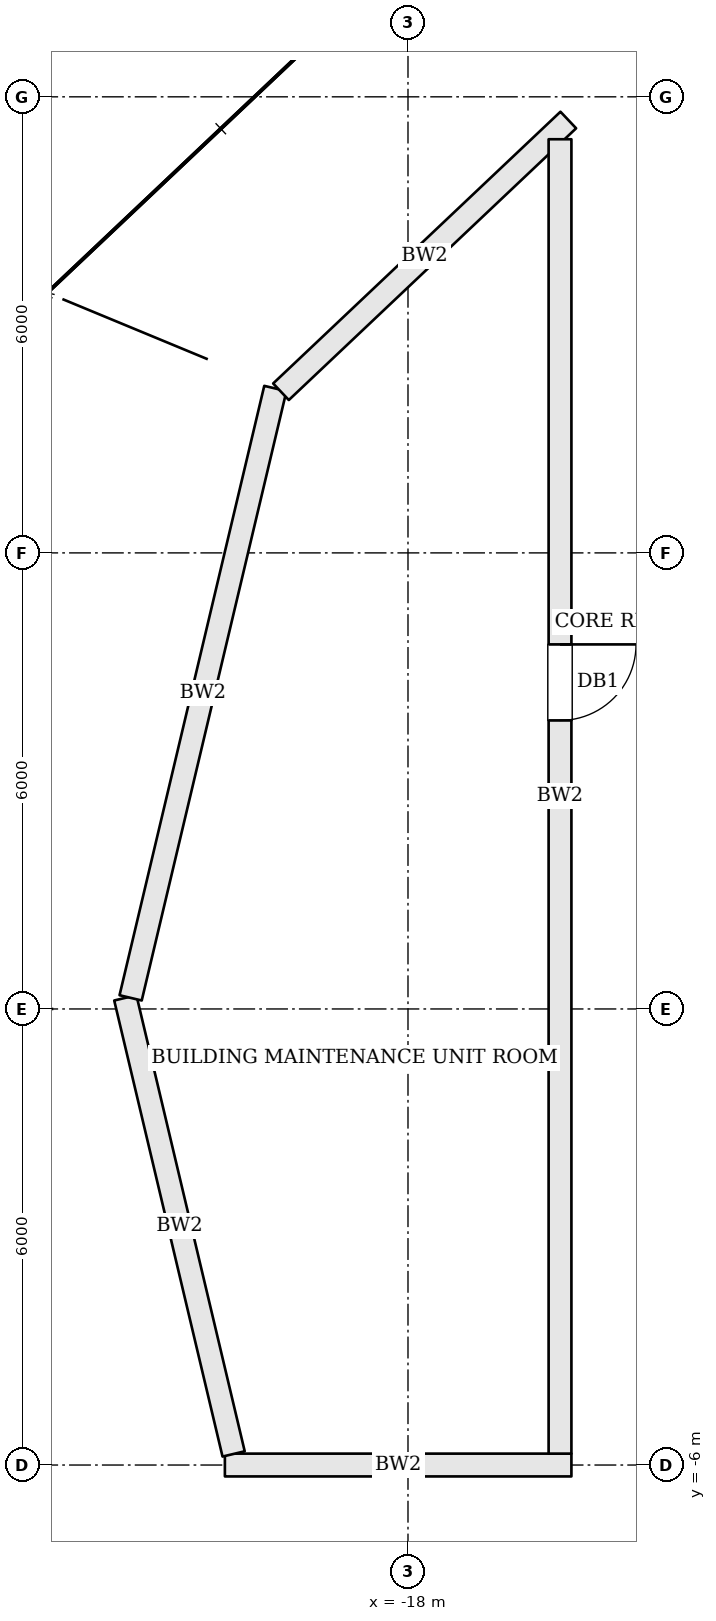
"""IFC4 building model, lengths in metres.
Left out: names, types, materials, properties, quantities, classifications, styles, units other than length and angle.
Written with IfcOpenShell. Run it as: python <this file> out.ifc"""

import sys

from ifc_helpers import new_model, si_unit, direction, frame, frame_2d, origin, place, context, subcontext, project, spatial, rectangle, extrude, element, fill, save


model = new_model("IFC4")
c1 = context("Model", 3, precision=1e-05, world=origin(), true_north=direction((0.0, 1.0)))
c2 = subcontext(c1, "Body", "Model", "MODEL_VIEW")
j1 = project(units=[si_unit("LENGTHUNIT", "METRE"), si_unit("PLANEANGLEUNIT", "RADIAN")], contexts=[c1])
p1 = place(None, origin())
s1 = spatial("IfcSite", under=j1, at=p1, CompositionType="ELEMENT")
p2 = place(p1, origin())
s2 = spatial("IfcBuilding", under=s1, at=p2, CompositionType="ELEMENT")
p3 = place(p2, frame((0.0, 0.0, 312.0)))
s3 = spatial("IfcBuildingStorey", under=s2, at=p3, CompositionType="ELEMENT", Elevation=312.0)
p4 = place(p3, frame((-15.85, -6.0, 0.0), z_axis=(0.0, 0.0, 1.0), x_axis=(-1.0, 0.0, 0.0)))
e1 = element("IfcWall", 1, at=p4, inside=s3, PredefinedType="SOLIDWALL", context=c2, shape_type="SweptSolid", body=[
    extrude(rectangle(XDim=4.559, YDim=0.3, at=frame_2d((2.279, 0.0))), origin(), (0.0, 0.0, 1.0), 3.534),
])
p5 = place(p3, frame((-20.294, -5.854, 0.0), z_axis=(0.0, 0.0, 1.0), x_axis=(-0.231079925788, 0.972934770629, 0.0)))
e2 = element("IfcWall", 2, at=p5, inside=s3, PredefinedType="SOLIDWALL", context=c2, shape_type="SweptSolid", body=[
    extrude(rectangle(XDim=6.167, YDim=0.3, at=frame_2d((3.083, 0.0))), origin(), (0.0, 0.0, 1.0), 3.534),
])
p6 = place(p3, frame((-21.649, 0.146, 0.0), z_axis=(0.0, 0.0, 1.0), x_axis=(0.231043682951, 0.972943377884, 0.0)))
e3 = element("IfcWall", 3, at=p6, inside=s3, PredefinedType="SOLIDWALL", context=c2, shape_type="SweptSolid", body=[
    extrude(rectangle(XDim=8.24, YDim=0.3, at=frame_2d((4.12, 0.0))), origin(), (0.0, 0.0, 1.0), 3.534),
])
p7 = place(p3, frame((-19.671, 8.12, 0.0), z_axis=(0.0, 0.0, 1.0), x_axis=(0.726518435151, 0.687146973642, 0.0)))
e4 = element("IfcWall", 4, at=p7, inside=s3, PredefinedType="SOLIDWALL", context=c2, shape_type="SweptSolid", body=[
    extrude(rectangle(XDim=5.203, YDim=0.3, at=frame_2d((2.601, 0.0))), origin(), (0.0, 0.0, 1.0), 3.534),
])
p8 = place(p3, frame((-16.0, 11.442, 0.0), z_axis=(0.0, 0.0, 1.0), x_axis=(0.0, -1.0, 0.0)))
e5 = element("IfcWall", 5, at=p8, inside=s3, PredefinedType="SOLIDWALL", context=c2, shape_type="SweptSolid", body=[
    extrude(rectangle(XDim=17.292, YDim=0.3, at=frame_2d((8.646, 0.0))), origin(), (0.0, 0.0, 1.0), 3.534),
])
p9 = place(p8, frame((6.646, 0.0, 0.0)))
e6 = element("IfcOpeningElement", 6, at=p9, cuts=e5, PredefinedType="OPENING", context=c2, shape_type="SweptSolid", body=[
    extrude(rectangle(XDim=1.0, YDim=2.1, at=frame_2d((0.5, 1.05))), frame((0.0, 0.16, 0.0), z_axis=(0.0, -1.0, 0.0), x_axis=(1.0, 0.0, 0.0)), (0.0, 0.0, 1.0), 0.32),
])
p10 = place(p9, origin())
e7 = element("IfcDoor", 7, at=p10, inside=s3, OperationType="SINGLE_SWING_LEFT", PredefinedType="DOOR", context=c2, shape_type="SweptSolid", body=[
    extrude(rectangle(XDim=1.0, YDim=2.1, at=frame_2d((0.5, 1.05))), frame((0.0, 0.025, 0.0), z_axis=(0.0, -1.0, 0.0), x_axis=(1.0, 0.0, 0.0)), (0.0, 0.0, 1.0), 0.05),
])
fill(e6, e7)
save(model, sys.argv[1])
